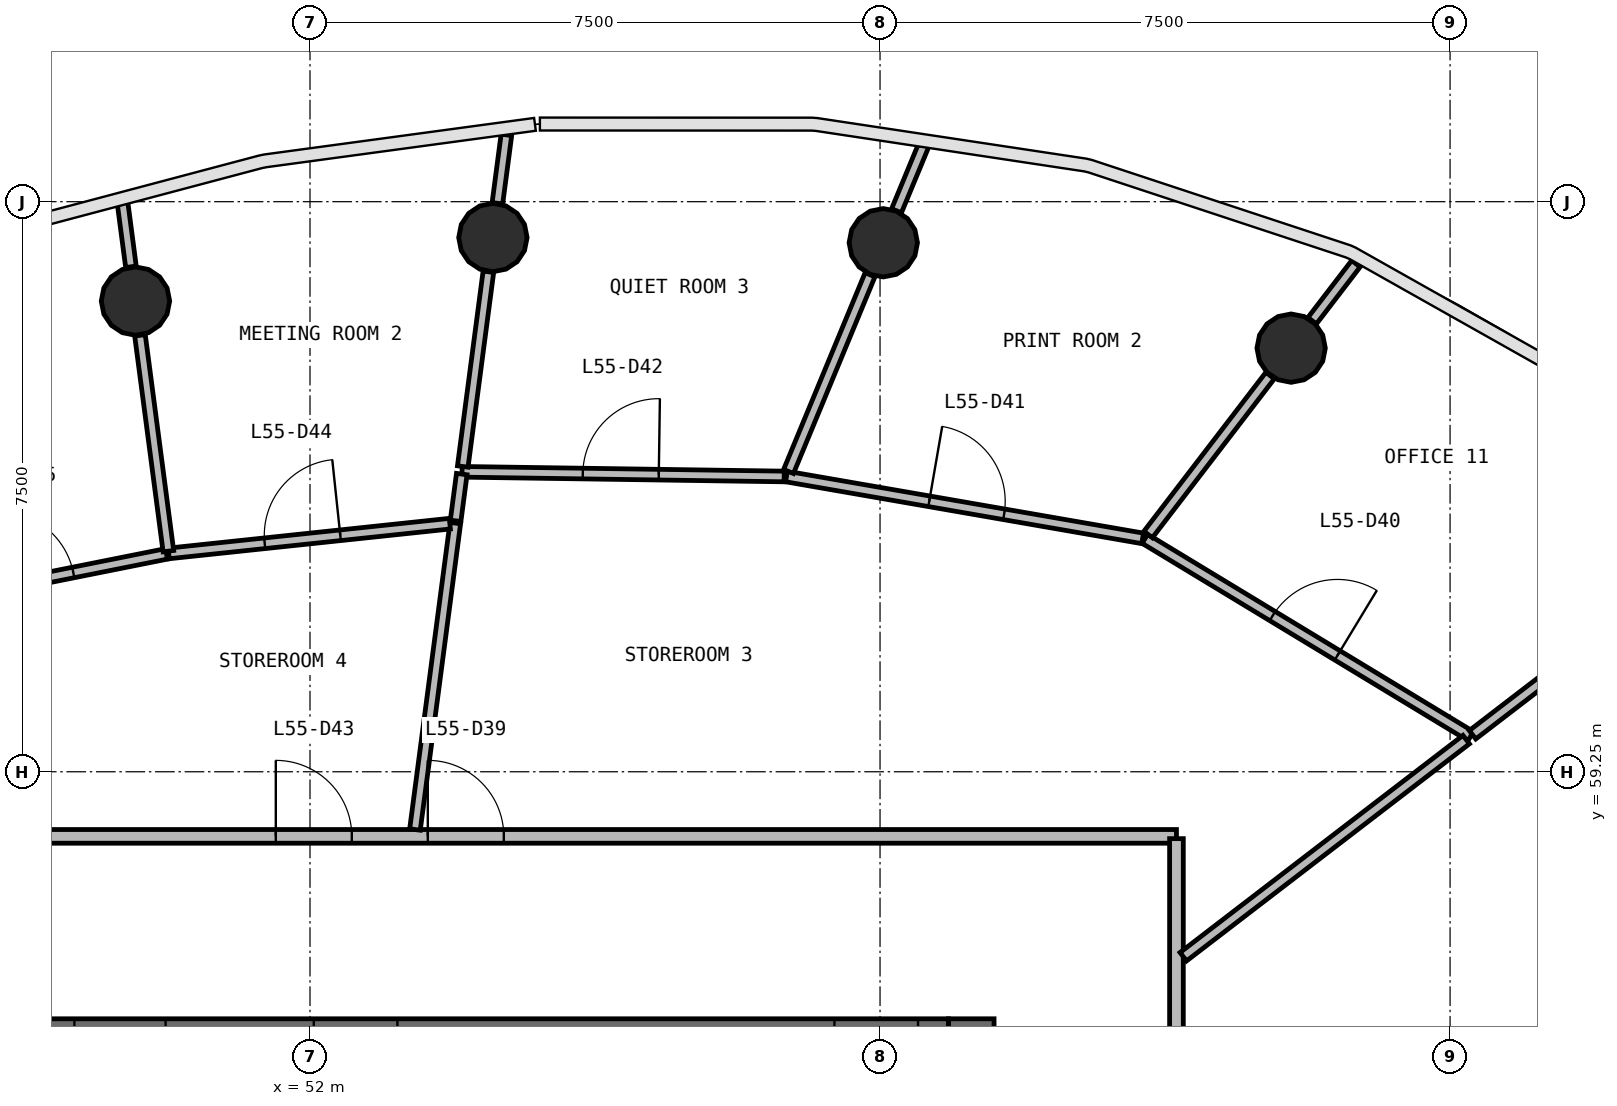
"""IFC4 building model, lengths in metres.
Left out: names, types, materials, properties, quantities, classifications, styles, units other than length and angle.
Written with IfcOpenShell. Run it as: python <this file> out.ifc"""

import sys

from ifc_helpers import new_model, si_unit, direction, frame, frame_2d, origin, origin_2d, place, context, subcontext, project, spatial, rectangle, circle, extrude, source, transform, mapped, element, fill, save


model = new_model("IFC4")
c1 = context("Model", 3, precision=1e-05, world=origin(), true_north=direction((0.0, 1.0)))
c2 = subcontext(c1, "Body", "Model", "MODEL_VIEW")
j1 = project(units=[si_unit("LENGTHUNIT", "METRE"), si_unit("PLANEANGLEUNIT", "RADIAN")], contexts=[c1])
p1 = place(None, origin())
s1 = spatial("IfcSite", under=j1, at=p1, CompositionType="ELEMENT")
p2 = place(p1, origin())
s2 = spatial("IfcBuilding", under=s1, at=p2, CompositionType="ELEMENT")
p3 = place(p2, frame((0.0, 0.0, 226.7)))
s3 = spatial("IfcBuildingStorey", under=s2, at=p3, CompositionType="ELEMENT", Elevation=226.7)
p4 = place(p3, frame((60.7, 40.0, 0.0), z_axis=(0.0, 0.0, 1.0), x_axis=(0.0, 1.0, 0.0)))
e1 = element("IfcWall", 1, at=p4, inside=s3, PredefinedType="SHEAR", context=c2, shape_type="SweptSolid", body=[
    extrude(rectangle(XDim=16.0, YDim=0.6, at=frame_2d((8.0, 0.0))), origin(), (0.0, 0.0, 1.0), 3.9),
])
p5 = place(p4, frame((7.1, 0.0, 0.0)))
e2 = element("IfcOpeningElement", 2, at=p5, cuts=e1, PredefinedType="OPENING", context=c2, shape_type="SweptSolid", body=[
    extrude(rectangle(XDim=1.8, YDim=2.1, at=frame_2d((0.9, 1.05))), frame((0.0, 0.31, 0.0), z_axis=(0.0, -1.0, 0.0), x_axis=(1.0, 0.0, 0.0)), (0.0, 0.0, 1.0), 0.62),
])
p6 = place(p3, frame((60.4, 55.7, 0.0), z_axis=(0.0, 0.0, 1.0), x_axis=(-1.0, 0.0, 0.0)))
e3 = element("IfcWall", 3, at=p6, inside=s3, PredefinedType="SHEAR", context=c2, shape_type="SweptSolid", body=[
    extrude(rectangle(XDim=16.8, YDim=0.6, at=frame_2d((8.4, 0.0))), origin(), (0.0, 0.0, 1.0), 3.9),
])
p7 = place(p6, frame((0.4, 0.0, 0.0)))
e4 = element("IfcOpeningElement", 4, at=p7, cuts=e3, PredefinedType="OPENING", context=c2, shape_type="SweptSolid", body=[
    extrude(rectangle(XDim=1.1, YDim=2.1, at=frame_2d((0.55, 1.05))), frame((0.0, 0.31, 0.0), z_axis=(0.0, -1.0, 0.0), x_axis=(1.0, 0.0, 0.0)), (0.0, 0.0, 1.0), 0.62),
])
p8 = place(p6, frame((10.3, 0.0, 0.0)))
e5 = element("IfcOpeningElement", 5, at=p8, cuts=e3, PredefinedType="OPENING", context=c2, shape_type="SweptSolid", body=[
    extrude(rectangle(XDim=1.2, YDim=2.1, at=frame_2d((0.6, 1.05))), frame((0.0, 0.31, 0.0), z_axis=(0.0, -1.0, 0.0), x_axis=(1.0, 0.0, 0.0)), (0.0, 0.0, 1.0), 0.62),
])
p9 = place(p6, frame((7.25, 0.0, 0.0)))
e6 = element("IfcOpeningElement", 6, at=p9, cuts=e3, PredefinedType="OPENING", context=c2, shape_type="SweptSolid", body=[
    extrude(rectangle(XDim=1.1, YDim=2.1, at=frame_2d((0.55, 1.05))), frame((0.0, 0.31, 0.0), z_axis=(0.0, -1.0, 0.0), x_axis=(1.0, 0.0, 0.0)), (0.0, 0.0, 1.0), 0.62),
])
m1 = source(origin(), c2, "Body", "SweptSolid", [
    extrude(circle(Radius=0.45, at=origin_2d()), origin(), (0.0, 0.0, 1.0), 3.9),
])
for number, where, z_axis, x_axis in (
    (7, (64.909, 64.823, 0.0), (0.0, 0.0, 1.0), (1.0, 0.0, 0.0)),
    (8, (59.543, 66.21, 0.0), (0.0, 0.0, 1.0), (1.0, 0.0, 0.0)),
    (9, (54.406, 66.278, 0.0), (0.0, 0.0, 1.0), (1.0, 0.0, 0.0)),
    (10, (49.704, 65.442, 0.0), (0.0, 0.0, 1.0), (1.0, 0.0, 0.0)),
):
    element("IfcColumn", number, at=place(p3, frame(where, z_axis=z_axis, x_axis=x_axis)), inside=s3, PredefinedType="COLUMN", context=c2, shape_type="MappedRepresentation", body=[
        mapped(m1, transform((0.0, 0.0, 0.0), scale=1.0)),
    ])
p10 = place(p3, frame((40.6, 58.4, 0.0), z_axis=(0.0, 0.0, 1.0), x_axis=(1.0, 0.0, 0.0)))
e11 = element("IfcWall", 11, at=p10, inside=s3, PredefinedType="PARTITIONING", context=c2, shape_type="SweptSolid", body=[
    extrude(rectangle(XDim=22.8, YDim=0.18, at=frame_2d((11.4, 0.0))), origin(), (0.0, 0.0, 1.0), 2.7),
])
p11 = place(p10, frame((2.05, 0.0, 0.0)))
e12 = element("IfcOpeningElement", 12, at=p11, cuts=e11, PredefinedType="OPENING", context=c2, shape_type="SweptSolid", body=[
    extrude(rectangle(XDim=0.9, YDim=2.1, at=frame_2d((0.45, 1.05))), frame((0.0, 0.1, 0.0), z_axis=(0.0, -1.0, 0.0), x_axis=(1.0, 0.0, 0.0)), (0.0, 0.0, 1.0), 0.2),
])
p12 = place(p10, frame((12.95, 0.0, 0.0)))
e13 = element("IfcOpeningElement", 13, at=p12, cuts=e11, PredefinedType="OPENING", context=c2, shape_type="SweptSolid", body=[
    extrude(rectangle(XDim=1.0, YDim=2.1, at=frame_2d((0.5, 1.05))), frame((0.0, 0.1, 0.0), z_axis=(0.0, -1.0, 0.0), x_axis=(1.0, 0.0, 0.0)), (0.0, 0.0, 1.0), 0.2),
])
p13 = place(p10, frame((10.95, 0.0, 0.0)))
e14 = element("IfcOpeningElement", 14, at=p13, cuts=e11, PredefinedType="OPENING", context=c2, shape_type="SweptSolid", body=[
    extrude(rectangle(XDim=1.0, YDim=2.1, at=frame_2d((0.5, 1.05))), frame((0.0, 0.1, 0.0), z_axis=(0.0, -1.0, 0.0), x_axis=(1.0, 0.0, 0.0)), (0.0, 0.0, 1.0), 0.2),
])
p14 = place(p3, frame((63.4, 58.37, 0.0), z_axis=(0.0, 0.0, 1.0), x_axis=(0.0, -1.0, 0.0)))
e15 = element("IfcWall", 15, at=p14, inside=s3, PredefinedType="PARTITIONING", context=c2, shape_type="SweptSolid", body=[
    extrude(rectangle(XDim=20.74, YDim=0.18, at=frame_2d((10.37, 0.0))), origin(), (0.0, 0.0, 1.0), 2.7),
])
p15 = place(p14, frame((12.09, 0.0, 0.0)))
e16 = element("IfcOpeningElement", 16, at=p15, cuts=e15, PredefinedType="OPENING", context=c2, shape_type="SweptSolid", body=[
    extrude(rectangle(XDim=1.0, YDim=2.1, at=frame_2d((0.5, 1.05))), frame((0.0, 0.1, 0.0), z_axis=(0.0, -1.0, 0.0), x_axis=(1.0, 0.0, 0.0)), (0.0, 0.0, 1.0), 0.2),
])
p16 = place(p14, frame((9.89, 0.0, 0.0)))
e17 = element("IfcOpeningElement", 17, at=p16, cuts=e15, PredefinedType="OPENING", context=c2, shape_type="SweptSolid", body=[
    extrude(rectangle(XDim=1.0, YDim=2.1, at=frame_2d((0.5, 1.05))), frame((0.0, 0.1, 0.0), z_axis=(0.0, -1.0, 0.0), x_axis=(1.0, 0.0, 0.0)), (0.0, 0.0, 1.0), 0.2),
])
p17 = place(p14, frame((4.29, 0.0, 0.0)))
e18 = element("IfcOpeningElement", 18, at=p17, cuts=e15, PredefinedType="OPENING", context=c2, shape_type="SweptSolid", body=[
    extrude(rectangle(XDim=1.0, YDim=2.1, at=frame_2d((0.5, 1.05))), frame((0.0, 0.1, 0.0), z_axis=(0.0, -1.0, 0.0), x_axis=(1.0, 0.0, 0.0)), (0.0, 0.0, 1.0), 0.2),
])
p18 = place(p3, frame((62.985, 62.315, 0.0), z_axis=(0.0, 0.0, 1.0), x_axis=(0.855336503229, -0.518072838744, 0.0)))
e19 = element("IfcWall", 19, at=p18, inside=s3, PredefinedType="PARTITIONING", context=c2, shape_type="SweptSolid", body=[
    extrude(rectangle(XDim=5.012, YDim=0.14, at=frame_2d((2.506, 0.0))), origin(), (0.0, 0.0, 1.0), 2.7),
])
p19 = place(p18, frame((1.962, 0.0, 0.0)))
e20 = element("IfcOpeningElement", 20, at=p19, cuts=e19, PredefinedType="OPENING", context=c2, shape_type="SweptSolid", body=[
    extrude(rectangle(XDim=1.0, YDim=2.1, at=frame_2d((0.5, 1.05))), frame((0.0, 0.08, 0.0), z_axis=(0.0, -1.0, 0.0), x_axis=(1.0, 0.0, 0.0)), (0.0, 0.0, 1.0), 0.16),
])
p20 = place(p3, frame((63.49, 56.817, 0.0), z_axis=(0.0, 0.0, 1.0), x_axis=(0.793370109793, 0.608739573945, 0.0)))
e21 = element("IfcWall", 21, at=p20, inside=s3, PredefinedType="PARTITIONING", context=c2, shape_type="SweptSolid", body=[
    extrude(rectangle(XDim=4.692, YDim=0.14, at=frame_2d((2.346, 0.0))), origin(), (0.0, 0.0, 1.0), 2.7),
])
p21 = place(p3, frame((58.269, 63.134, 0.0), z_axis=(0.0, 0.0, 1.0), x_axis=(0.985247147455, -0.171137542441, 0.0)))
e22 = element("IfcWall", 22, at=p21, inside=s3, PredefinedType="PARTITIONING", context=c2, shape_type="SweptSolid", body=[
    extrude(rectangle(XDim=4.756, YDim=0.14, at=frame_2d((2.378, 0.0))), origin(), (0.0, 0.0, 1.0), 2.7),
])
p22 = place(p21, frame((1.906, 0.0, 0.0)))
e23 = element("IfcOpeningElement", 23, at=p22, cuts=e22, PredefinedType="OPENING", context=c2, shape_type="SweptSolid", body=[
    extrude(rectangle(XDim=1.0, YDim=2.1, at=frame_2d((0.5, 1.05))), frame((0.0, 0.08, 0.0), z_axis=(0.0, -1.0, 0.0), x_axis=(1.0, 0.0, 0.0)), (0.0, 0.0, 1.0), 0.16),
])
p23 = place(p3, frame((67.955, 54.609, 0.0), z_axis=(0.0, 0.0, 1.0), x_axis=(0.923881204853, 0.38267939495, 0.0)))
e24 = element("IfcWall", 24, at=p23, inside=s3, PredefinedType="PARTITIONING", context=c2, shape_type="SweptSolid", body=[
    extrude(rectangle(XDim=4.739, YDim=0.14, at=frame_2d((2.37, 0.0))), origin(), (0.0, 0.0, 1.0), 2.7),
])
p24 = place(p3, frame((54.0, 63.196, 0.0), z_axis=(0.0, 0.0, 1.0), x_axis=(0.99989466978, -0.014513763999, 0.0)))
e25 = element("IfcWall", 25, at=p24, inside=s3, PredefinedType="PARTITIONING", context=c2, shape_type="SweptSolid", body=[
    extrude(rectangle(XDim=4.239, YDim=0.14, at=frame_2d((2.12, 0.0))), origin(), (0.0, 0.0, 1.0), 2.7),
])
p25 = place(p24, frame((1.589, 0.0, 0.0)))
e26 = element("IfcOpeningElement", 26, at=p25, cuts=e25, PredefinedType="OPENING", context=c2, shape_type="SweptSolid", body=[
    extrude(rectangle(XDim=1.0, YDim=2.1, at=frame_2d((0.5, 1.05))), frame((0.0, 0.08, 0.0), z_axis=(0.0, -1.0, 0.0), x_axis=(1.0, 0.0, 0.0)), (0.0, 0.0, 1.0), 0.16),
])
p26 = place(p3, frame((53.381, 58.49, 0.0), z_axis=(0.0, 0.0, 1.0), x_axis=(0.13052750874, 0.99144468805, 0.0)))
e27 = element("IfcWall", 27, at=p26, inside=s3, PredefinedType="PARTITIONING", context=c2, shape_type="SweptSolid", body=[
    extrude(rectangle(XDim=4.066, YDim=0.14, at=frame_2d((2.033, 0.0))), origin(), (0.0, 0.0, 1.0), 2.7),
])
p27 = place(p3, frame((50.141, 62.122, 0.0), z_axis=(0.0, 0.0, 1.0), x_axis=(0.994443424191, 0.105272389942, 0.0)))
e28 = element("IfcWall", 28, at=p27, inside=s3, PredefinedType="PARTITIONING", context=c2, shape_type="SweptSolid", body=[
    extrude(rectangle(XDim=3.72, YDim=0.14, at=frame_2d((1.86, 0.0))), origin(), (0.0, 0.0, 1.0), 2.7),
])
p28 = place(p27, frame((1.27, 0.0, 0.0)))
e29 = element("IfcOpeningElement", 29, at=p28, cuts=e28, PredefinedType="OPENING", context=c2, shape_type="SweptSolid", body=[
    extrude(rectangle(XDim=1.0, YDim=2.1, at=frame_2d((0.5, 1.05))), frame((0.0, 0.08, 0.0), z_axis=(0.0, -1.0, 0.0), x_axis=(1.0, 0.0, 0.0)), (0.0, 0.0, 1.0), 0.16),
])
p29 = place(p3, frame((46.485, 61.392, 0.0), z_axis=(0.0, 0.0, 1.0), x_axis=(0.980631422481, 0.195862230259, 0.0)))
e30 = element("IfcWall", 30, at=p29, inside=s3, PredefinedType="PARTITIONING", context=c2, shape_type="SweptSolid", body=[
    extrude(rectangle(XDim=3.698, YDim=0.14, at=frame_2d((1.849, 0.0))), origin(), (0.0, 0.0, 1.0), 2.7),
])
p30 = place(p29, frame((1.448, 0.0, 0.0)))
e31 = element("IfcOpeningElement", 31, at=p30, cuts=e30, PredefinedType="OPENING", context=c2, shape_type="SweptSolid", body=[
    extrude(rectangle(XDim=1.0, YDim=2.1, at=frame_2d((0.5, 1.05))), frame((0.0, 0.08, 0.0), z_axis=(0.0, -1.0, 0.0), x_axis=(1.0, 0.0, 0.0)), (0.0, 0.0, 1.0), 0.16),
])
p31 = place(p3, frame((50.137, 62.152, 0.0), z_axis=(0.0, 0.0, 1.0), x_axis=(-0.130577981436, 0.991438041818, 0.0)))
e32 = element("IfcWall", 32, at=p31, inside=s3, PredefinedType="PARTITIONING", context=c2, shape_type="SweptSolid", body=[
    extrude(rectangle(XDim=2.864, YDim=0.14, at=frame_2d((1.432, 0.0))), origin(), (0.0, 0.0, 1.0), 2.7),
])
p32 = place(p3, frame((58.296, 63.201, 0.0), z_axis=(0.0, 0.0, 1.0), x_axis=(0.38269039354, 0.923876649068, 0.0)))
e33 = element("IfcWall", 33, at=p32, inside=s3, PredefinedType="PARTITIONING", context=c2, shape_type="SweptSolid", body=[
    extrude(rectangle(XDim=2.802, YDim=0.14, at=frame_2d((1.401, 0.0))), origin(), (0.0, 0.0, 1.0), 2.7),
])
p33 = place(p3, frame((67.295, 59.737, 0.0), z_axis=(0.0, 0.0, 1.0), x_axis=(0.793344806352, 0.608772550494, 0.0)))
e34 = element("IfcWall", 34, at=p33, inside=s3, PredefinedType="PARTITIONING", context=c2, shape_type="SweptSolid", body=[
    extrude(rectangle(XDim=2.705, YDim=0.14, at=frame_2d((1.353, 0.0))), origin(), (0.0, 0.0, 1.0), 2.7),
])
p34 = place(p3, frame((63.027, 62.371, 0.0), z_axis=(0.0, 0.0, 1.0), x_axis=(0.60876591882, 0.793349895118, 0.0)))
e35 = element("IfcWall", 35, at=p34, inside=s3, PredefinedType="PARTITIONING", context=c2, shape_type="SweptSolid", body=[
    extrude(rectangle(XDim=2.636, YDim=0.14, at=frame_2d((1.318, 0.0))), origin(), (0.0, 0.0, 1.0), 2.7),
])
p35 = place(p3, frame((54.01, 63.266, 0.0), z_axis=(0.0, 0.0, 1.0), x_axis=(0.130591396483, 0.991436274888, 0.0)))
e36 = element("IfcWall", 36, at=p35, inside=s3, PredefinedType="PARTITIONING", context=c2, shape_type="SweptSolid", body=[
    extrude(rectangle(XDim=2.584, YDim=0.14, at=frame_2d((1.292, 0.0))), origin(), (0.0, 0.0, 1.0), 2.7),
])
p36 = place(p3, frame((59.717, 66.63, 0.0), z_axis=(0.0, 0.0, 1.0), x_axis=(0.382721574091, 0.923863732769, 0.0)))
e37 = element("IfcWall", 37, at=p36, inside=s3, PredefinedType="PARTITIONING", context=c2, shape_type="SweptSolid", body=[
    extrude(rectangle(XDim=0.952, YDim=0.14, at=frame_2d((0.476, 0.0))), origin(), (0.0, 0.0, 1.0), 2.7),
])
p37 = place(p3, frame((65.186, 65.184, 0.0), z_axis=(0.0, 0.0, 1.0), x_axis=(0.608637437939, 0.793448466593, 0.0)))
e38 = element("IfcWall", 38, at=p37, inside=s3, PredefinedType="PARTITIONING", context=c2, shape_type="SweptSolid", body=[
    extrude(rectangle(XDim=0.946, YDim=0.14, at=frame_2d((0.473, 0.0))), origin(), (0.0, 0.0, 1.0), 2.7),
])
p38 = place(p3, frame((54.466, 66.729, 0.0), z_axis=(0.0, 0.0, 1.0), x_axis=(0.130419732187, 0.991458871288, 0.0)))
e39 = element("IfcWall", 39, at=p38, inside=s3, PredefinedType="PARTITIONING", context=c2, shape_type="SweptSolid", body=[
    extrude(rectangle(XDim=0.908, YDim=0.14, at=frame_2d((0.454, 0.0))), origin(), (0.0, 0.0, 1.0), 2.7),
])
p39 = place(p3, frame((49.644, 65.893, 0.0), z_axis=(0.0, 0.0, 1.0), x_axis=(-0.130469380283, 0.991452339151, 0.0)))
e40 = element("IfcWall", 40, at=p39, inside=s3, PredefinedType="PARTITIONING", context=c2, shape_type="SweptSolid", body=[
    extrude(rectangle(XDim=0.85, YDim=0.14, at=frame_2d((0.425, 0.0))), origin(), (0.0, 0.0, 1.0), 2.7),
])
p40 = place(p3, frame((53.916, 62.551, 0.0), z_axis=(0.0, 0.0, 1.0), x_axis=(0.130230601284, 0.991483731833, 0.0)))
e41 = element("IfcWall", 41, at=p40, inside=s3, PredefinedType="PARTITIONING", context=c2, shape_type="SweptSolid", body=[
    extrude(rectangle(XDim=0.621, YDim=0.14, at=frame_2d((0.31, 0.0))), origin(), (0.0, 0.0, 1.0), 2.7),
])
m2 = source(origin(), c2, "Body", "SweptSolid", [
    extrude(rectangle(XDim=1.0, YDim=2.1, at=frame_2d((0.5, 1.05))), frame((0.0, 0.025, 0.0), z_axis=(0.0, -1.0, 0.0), x_axis=(1.0, 0.0, 0.0)), (0.0, 0.0, 1.0), 0.05),
])
p41 = place(p12, origin())
e42 = element("IfcDoor", 42, at=p41, inside=s3, OperationType="SINGLE_SWING_LEFT", PredefinedType="DOOR", context=c2, shape_type="MappedRepresentation", body=[
    mapped(m2, transform((0.0, 0.0, 0.0), scale=1.0)),
])
fill(e13, e42)
p42 = place(p19, origin())
e43 = element("IfcDoor", 43, at=p42, inside=s3, OperationType="SINGLE_SWING_RIGHT", PredefinedType="DOOR", context=c2, shape_type="MappedRepresentation", body=[
    mapped(m2, transform((0.0, 0.0, 0.0), scale=1.0)),
])
fill(e20, e43)
p43 = place(p22, origin())
e44 = element("IfcDoor", 44, at=p43, inside=s3, OperationType="SINGLE_SWING_LEFT", PredefinedType="DOOR", context=c2, shape_type="MappedRepresentation", body=[
    mapped(m2, transform((0.0, 0.0, 0.0), scale=1.0)),
])
fill(e23, e44)
p44 = place(p25, origin())
e45 = element("IfcDoor", 45, at=p44, inside=s3, OperationType="SINGLE_SWING_RIGHT", PredefinedType="DOOR", context=c2, shape_type="MappedRepresentation", body=[
    mapped(m2, transform((0.0, 0.0, 0.0), scale=1.0)),
])
fill(e26, e45)
p45 = place(p13, origin())
e46 = element("IfcDoor", 46, at=p45, inside=s3, OperationType="SINGLE_SWING_LEFT", PredefinedType="DOOR", context=c2, shape_type="MappedRepresentation", body=[
    mapped(m2, transform((0.0, 0.0, 0.0), scale=1.0)),
])
fill(e14, e46)
p46 = place(p28, origin())
e47 = element("IfcDoor", 47, at=p46, inside=s3, OperationType="SINGLE_SWING_RIGHT", PredefinedType="DOOR", context=c2, shape_type="MappedRepresentation", body=[
    mapped(m2, transform((0.0, 0.0, 0.0), scale=1.0)),
])
fill(e29, e47)
p47 = place(p30, origin())
e48 = element("IfcDoor", 48, at=p47, inside=s3, OperationType="SINGLE_SWING_LEFT", PredefinedType="DOOR", context=c2, shape_type="MappedRepresentation", body=[
    mapped(m2, transform((0.0, 0.0, 0.0), scale=1.0)),
])
fill(e31, e48)
save(model, sys.argv[1])
